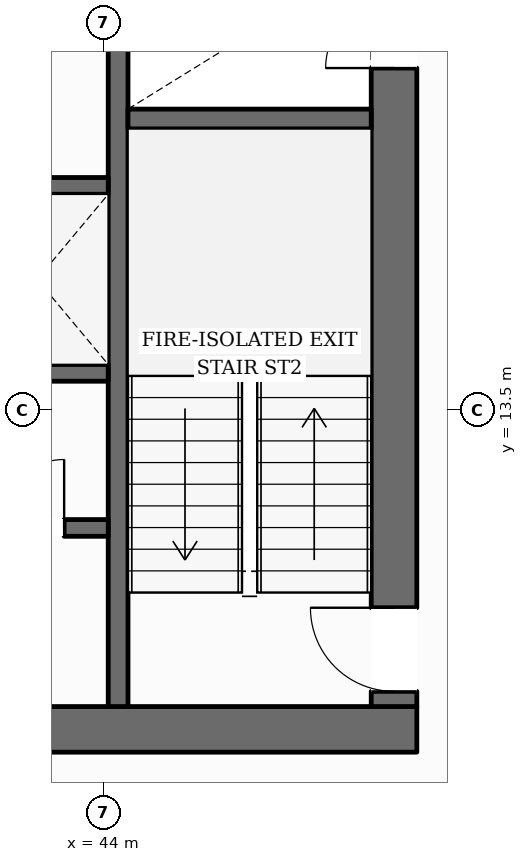
"""IFC4 building model, lengths in metres.
Left out: names, types, materials, properties, quantities, classifications, styles, units other than length and angle.
Written with IfcOpenShell. Run it as: python <this file> out.ifc"""

import sys

from ifc_helpers import new_model, si_unit, direction, frame, frame_2d, origin, place, context, subcontext, project, spatial, rectangle, extrude, element, fill, save


model = new_model("IFC4")
c1 = context("Model", 3, precision=1e-05, world=origin(), true_north=direction((0.0, 1.0)))
c2 = subcontext(c1, "Body", "Model", "MODEL_VIEW")
j1 = project(units=[si_unit("LENGTHUNIT", "METRE"), si_unit("PLANEANGLEUNIT", "RADIAN")], contexts=[c1])
p1 = place(None, origin())
s1 = spatial("IfcSite", under=j1, at=p1, CompositionType="ELEMENT")
p2 = place(p1, origin())
s2 = spatial("IfcBuilding", under=s1, at=p2, CompositionType="ELEMENT")
p3 = place(p2, frame((0.0, 0.0, 48.35)))
s3 = spatial("IfcBuildingStorey", under=s2, at=p3, CompositionType="ELEMENT", Elevation=48.35)
p4 = place(p3, frame((27.88, 9.3, 0.0), z_axis=(0.0, 0.0, 1.0), x_axis=(1.0, 0.0, 0.0)))
e1 = element("IfcWall", 1, at=p4, inside=s3, PredefinedType="SOLIDWALL", context=c2, shape_type="SweptSolid", body=[
    extrude(rectangle(XDim=20.24, YDim=0.6, at=frame_2d((10.12, 0.0))), origin(), (0.0, 0.0, 1.0), 3.59),
])
p5 = place(p4, frame((10.62, 0.0, 0.0)))
e2 = element("IfcOpeningElement", 2, at=p5, cuts=e1, PredefinedType="OPENING", context=c2, shape_type="SweptSolid", body=[
    extrude(rectangle(XDim=1.4, YDim=2.2, at=frame_2d((0.7, 1.1))), frame((0.0, 0.31, 0.0), z_axis=(0.0, -1.0, 0.0), x_axis=(1.0, 0.0, 0.0)), (0.0, 0.0, 1.0), 0.62),
])
p6 = place(p3, frame((47.82, 9.6, 0.0), z_axis=(0.0, 0.0, 1.0), x_axis=(0.0, 1.0, 0.0)))
e3 = element("IfcWall", 3, at=p6, inside=s3, PredefinedType="SOLIDWALL", context=c2, shape_type="SweptSolid", body=[
    extrude(rectangle(XDim=13.0, YDim=0.6, at=frame_2d((6.5, 0.0))), origin(), (0.0, 0.0, 1.0), 3.59),
])
p7 = place(p6, frame((0.2, 0.0, 0.0)))
e4 = element("IfcOpeningElement", 4, at=p7, cuts=e3, PredefinedType="OPENING", context=c2, shape_type="SweptSolid", body=[
    extrude(rectangle(XDim=1.1, YDim=2.15, at=frame_2d((0.55, 1.075))), frame((0.0, 0.31, 0.0), z_axis=(0.0, -1.0, 0.0), x_axis=(1.0, 0.0, 0.0)), (0.0, 0.0, 1.0), 0.62),
])
p8 = place(p6, frame((8.4, 0.0, 0.0)))
e5 = element("IfcOpeningElement", 5, at=p8, cuts=e3, PredefinedType="OPENING", context=c2, shape_type="SweptSolid", body=[
    extrude(rectangle(XDim=0.9, YDim=2.1, at=frame_2d((0.45, 1.05))), frame((0.0, 0.31, 0.0), z_axis=(0.0, -1.0, 0.0), x_axis=(1.0, 0.0, 0.0)), (0.0, 0.0, 1.0), 0.62),
])
p9 = place(p3, frame((44.19, 9.6, 0.0), z_axis=(0.0, 0.0, 1.0), x_axis=(0.0, 1.0, 0.0)))
e6 = element("IfcWall", 6, at=p9, inside=s3, PredefinedType="SHEAR", context=c2, shape_type="SweptSolid", body=[
    extrude(rectangle(XDim=13.0, YDim=0.26, at=frame_2d((6.5, 0.0))), origin(), (0.0, 0.0, 1.0), 3.59),
])
p10 = place(p9, frame((10.925, 0.0, 0.0)))
e7 = element("IfcOpeningElement", 7, at=p10, cuts=e6, PredefinedType="OPENING", context=c2, shape_type="SweptSolid", body=[
    extrude(rectangle(XDim=1.25, YDim=2.25, at=frame_2d((0.625, 1.125))), frame((0.0, 0.14, 0.0), z_axis=(0.0, -1.0, 0.0), x_axis=(1.0, 0.0, 0.0)), (0.0, 0.0, 1.0), 0.28),
])
p11 = place(p3, frame((44.32, 17.33, 0.0), z_axis=(0.0, 0.0, 1.0), x_axis=(1.0, 0.0, 0.0)))
e8 = element("IfcWall", 8, at=p11, inside=s3, PredefinedType="SHEAR", context=c2, shape_type="SweptSolid", body=[
    extrude(rectangle(XDim=3.2, YDim=0.26, at=frame_2d((1.6, 0.0))), origin(), (0.0, 0.0, 1.0), 3.59),
])
p12 = place(p3, frame((31.94, 16.45, 0.0), z_axis=(0.0, 0.0, 1.0), x_axis=(1.0, 0.0, 0.0)))
e9 = element("IfcWall", 9, at=p12, inside=s3, PredefinedType="SOLIDWALL", context=c2, shape_type="SweptSolid", body=[
    extrude(rectangle(XDim=12.12, YDim=0.22, at=frame_2d((6.06, 0.0))), origin(), (0.0, 0.0, 1.0), 3.59),
])
p13 = place(p3, frame((31.94, 13.99, 0.0), z_axis=(0.0, 0.0, 1.0), x_axis=(1.0, 0.0, 0.0)))
e10 = element("IfcWall", 10, at=p13, inside=s3, PredefinedType="SOLIDWALL", context=c2, shape_type="SweptSolid", body=[
    extrude(rectangle(XDim=12.12, YDim=0.22, at=frame_2d((6.06, 0.0))), origin(), (0.0, 0.0, 1.0), 3.59),
])
p14 = place(p13, frame((0.385, 0.0, 0.0)))
e11 = element("IfcOpeningElement", 11, at=p14, cuts=e10, PredefinedType="OPENING", context=c2, shape_type="SweptSolid", body=[
    extrude(rectangle(XDim=1.1, YDim=2.2, at=frame_2d((0.55, 1.1))), frame((0.0, 0.12, 0.0), z_axis=(0.0, -1.0, 0.0), x_axis=(1.0, 0.0, 0.0)), (0.0, 0.0, 1.0), 0.24),
])
p15 = place(p13, frame((2.435, 0.0, 0.0)))
e12 = element("IfcOpeningElement", 12, at=p15, cuts=e10, PredefinedType="OPENING", context=c2, shape_type="SweptSolid", body=[
    extrude(rectangle(XDim=1.1, YDim=2.2, at=frame_2d((0.55, 1.1))), frame((0.0, 0.12, 0.0), z_axis=(0.0, -1.0, 0.0), x_axis=(1.0, 0.0, 0.0)), (0.0, 0.0, 1.0), 0.24),
])
p16 = place(p13, frame((4.485, 0.0, 0.0)))
e13 = element("IfcOpeningElement", 13, at=p16, cuts=e10, PredefinedType="OPENING", context=c2, shape_type="SweptSolid", body=[
    extrude(rectangle(XDim=1.1, YDim=2.2, at=frame_2d((0.55, 1.1))), frame((0.0, 0.12, 0.0), z_axis=(0.0, -1.0, 0.0), x_axis=(1.0, 0.0, 0.0)), (0.0, 0.0, 1.0), 0.24),
])
p17 = place(p3, frame((40.28, 11.95, 0.0), z_axis=(0.0, 0.0, 1.0), x_axis=(1.0, 0.0, 0.0)))
e14 = element("IfcWall", 14, at=p17, inside=s3, PredefinedType="SOLIDWALL", context=c2, shape_type="SweptSolid", body=[
    extrude(rectangle(XDim=3.78, YDim=0.22, at=frame_2d((1.89, 0.0))), origin(), (0.0, 0.0, 1.0), 3.59),
])
p18 = place(p17, frame((0.47, 0.0, 0.0)))
e15 = element("IfcOpeningElement", 15, at=p18, cuts=e14, PredefinedType="OPENING", context=c2, shape_type="SweptSolid", body=[
    extrude(rectangle(XDim=0.9, YDim=2.1, at=frame_2d((0.45, 1.05))), frame((0.0, 0.12, 0.0), z_axis=(0.0, -1.0, 0.0), x_axis=(1.0, 0.0, 0.0)), (0.0, 0.0, 1.0), 0.24),
])
p19 = place(p17, frame((2.3, 0.0, 0.0)))
e16 = element("IfcOpeningElement", 16, at=p19, cuts=e14, PredefinedType="OPENING", context=c2, shape_type="SweptSolid", body=[
    extrude(rectangle(XDim=0.9, YDim=2.1, at=frame_2d((0.45, 1.05))), frame((0.0, 0.12, 0.0), z_axis=(0.0, -1.0, 0.0), x_axis=(1.0, 0.0, 0.0)), (0.0, 0.0, 1.0), 0.24),
])
p20 = place(p3, frame((45.56, 44.402, 0.0), z_axis=(0.0, 0.0, 1.0), x_axis=(0.504140111044, -0.86362187816, 0.0)))
e17 = element("IfcWall", 17, at=p20, inside=s3, PredefinedType="STANDARD", context=c2, shape_type="SweptSolid", body=[
    extrude(rectangle(XDim=35.254, YDim=0.38, at=frame_2d((17.627, 0.0))), origin(), (0.0, 0.0, 1.0), 2.97),
])
p21 = place(p20, frame((31.093, 0.0, 0.65)))
e18 = element("IfcOpeningElement", 18, at=p21, cuts=e17, PredefinedType="OPENING", context=c2, shape_type="SweptSolid", body=[
    extrude(rectangle(XDim=1.65, YDim=1.75, at=frame_2d((0.825, 0.875))), frame((0.0, 0.2, 0.0), z_axis=(0.0, -1.0, 0.0), x_axis=(1.0, 0.0, 0.0)), (0.0, 0.0, 1.0), 0.4),
])
p22 = place(p20, frame((25.375, 0.0, 0.65)))
e19 = element("IfcOpeningElement", 19, at=p22, cuts=e17, PredefinedType="OPENING", context=c2, shape_type="SweptSolid", body=[
    extrude(rectangle(XDim=1.65, YDim=1.75, at=frame_2d((0.825, 0.875))), frame((0.0, 0.2, 0.0), z_axis=(0.0, -1.0, 0.0), x_axis=(1.0, 0.0, 0.0)), (0.0, 0.0, 1.0), 0.4),
])
p23 = place(p20, frame((19.658, 0.0, 0.65)))
e20 = element("IfcOpeningElement", 20, at=p23, cuts=e17, PredefinedType="OPENING", context=c2, shape_type="SweptSolid", body=[
    extrude(rectangle(XDim=1.65, YDim=1.75, at=frame_2d((0.825, 0.875))), frame((0.0, 0.2, 0.0), z_axis=(0.0, -1.0, 0.0), x_axis=(1.0, 0.0, 0.0)), (0.0, 0.0, 1.0), 0.4),
])
p24 = place(p20, frame((8.224, 0.0, 0.65)))
e21 = element("IfcOpeningElement", 21, at=p24, cuts=e17, PredefinedType="OPENING", context=c2, shape_type="SweptSolid", body=[
    extrude(rectangle(XDim=1.65, YDim=1.75, at=frame_2d((0.825, 0.875))), frame((0.0, 0.2, 0.0), z_axis=(0.0, -1.0, 0.0), x_axis=(1.0, 0.0, 0.0)), (0.0, 0.0, 1.0), 0.4),
])
p25 = place(p20, frame((2.507, 0.0, 0.65)))
e22 = element("IfcOpeningElement", 22, at=p25, cuts=e17, PredefinedType="OPENING", context=c2, shape_type="SweptSolid", body=[
    extrude(rectangle(XDim=1.65, YDim=1.75, at=frame_2d((0.825, 0.875))), frame((0.0, 0.2, 0.0), z_axis=(0.0, -1.0, 0.0), x_axis=(1.0, 0.0, 0.0)), (0.0, 0.0, 1.0), 0.4),
])
p26 = place(p7, origin())
e23 = element("IfcDoor", 23, at=p26, inside=s3, OperationType="SINGLE_SWING_RIGHT", PredefinedType="DOOR", context=c2, shape_type="SweptSolid", body=[
    extrude(rectangle(XDim=1.1, YDim=2.15, at=frame_2d((0.55, 1.075))), frame((0.0, 0.025, 0.0), z_axis=(0.0, -1.0, 0.0), x_axis=(1.0, 0.0, 0.0)), (0.0, 0.0, 1.0), 0.05),
])
fill(e4, e23)
p27 = place(p8, origin())
e24 = element("IfcDoor", 24, at=p27, inside=s3, OperationType="SINGLE_SWING_LEFT", PredefinedType="DOOR", context=c2, shape_type="SweptSolid", body=[
    extrude(rectangle(XDim=0.9, YDim=2.1, at=frame_2d((0.45, 1.05))), frame((0.0, 0.025, 0.0), z_axis=(0.0, -1.0, 0.0), x_axis=(1.0, 0.0, 0.0)), (0.0, 0.0, 1.0), 0.05),
])
fill(e5, e24)
p28 = place(p19, origin())
e25 = element("IfcDoor", 25, at=p28, inside=s3, OperationType="SINGLE_SWING_RIGHT", PredefinedType="DOOR", context=c2, shape_type="SweptSolid", body=[
    extrude(rectangle(XDim=0.9, YDim=2.1, at=frame_2d((0.45, 1.05))), frame((0.0, 0.025, 0.0), z_axis=(0.0, -1.0, 0.0), x_axis=(1.0, 0.0, 0.0)), (0.0, 0.0, 1.0), 0.05),
])
fill(e16, e25)
save(model, sys.argv[1])
